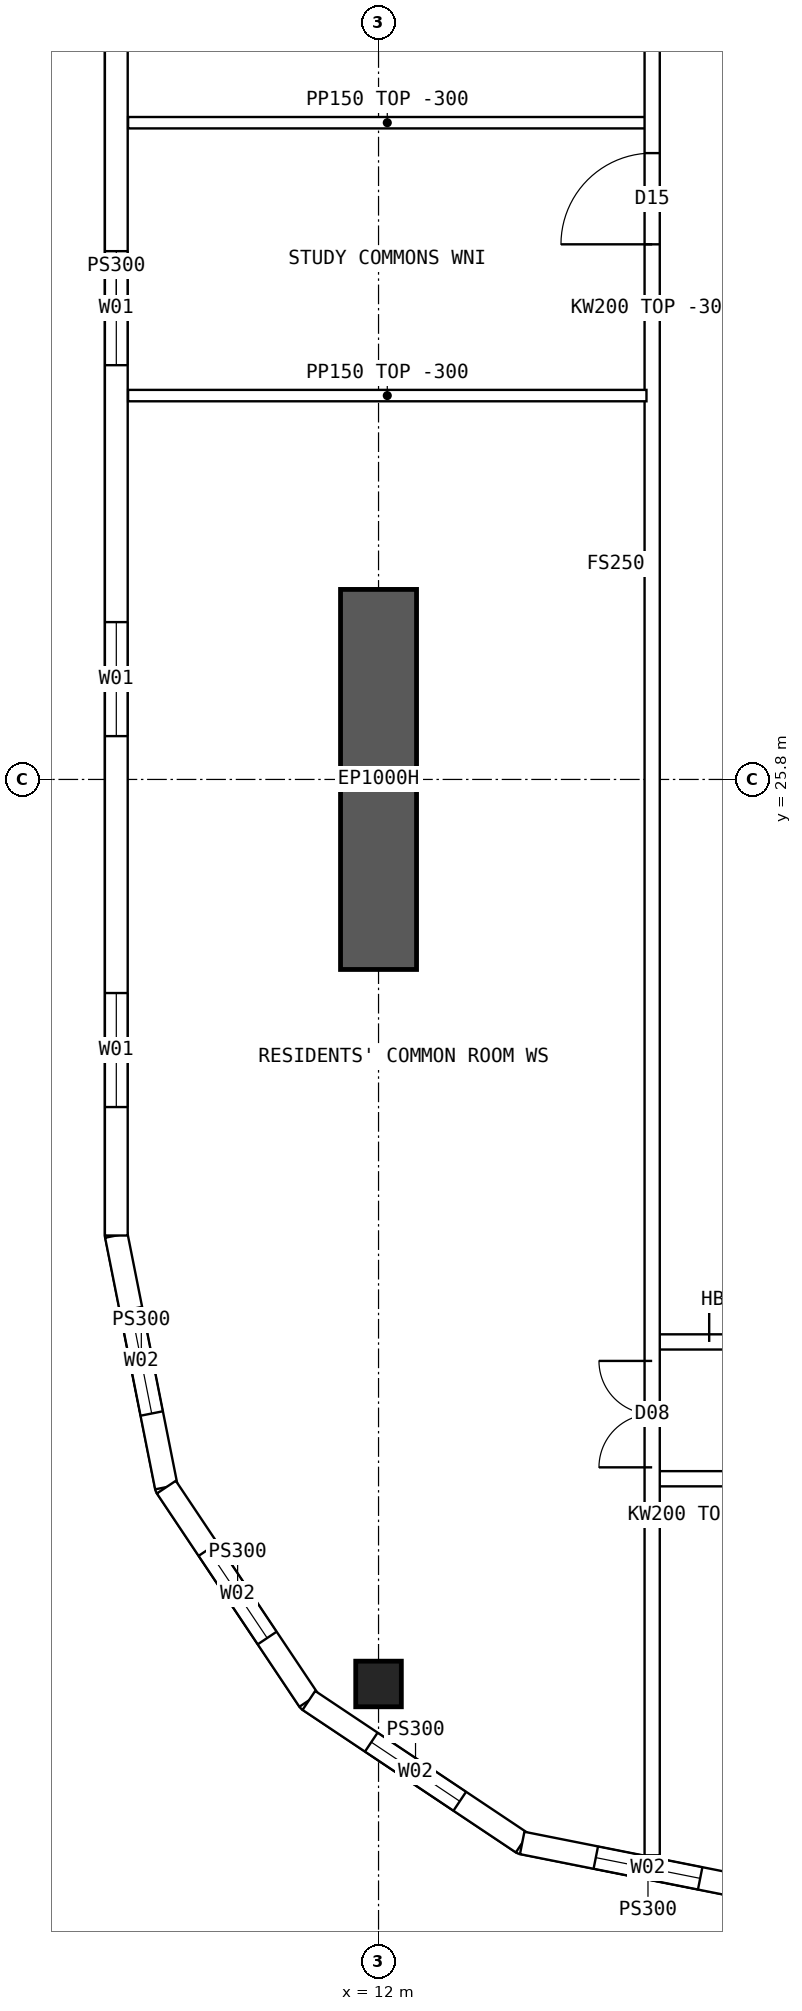
"""IFC4 building model, lengths in metres.
Left out: names, types, materials, properties, quantities, classifications, styles, units other than length and angle.
Written with IfcOpenShell. Run it as: python <this file> out.ifc"""

import sys

from ifc_helpers import new_model, si_unit, direction, frame, frame_2d, origin, origin_2d, place, context, subcontext, project, spatial, polyline, rectangle, hollow_rectangle, outline, extrude, element, fill, save


model = new_model("IFC4")
c1 = context("Model", 3, precision=1e-05, world=origin(), true_north=direction((0.0, 1.0)))
c2 = subcontext(c1, "Body", "Model", "MODEL_VIEW")
j1 = project(units=[si_unit("LENGTHUNIT", "METRE"), si_unit("PLANEANGLEUNIT", "RADIAN")], contexts=[c1])
p1 = place(None, origin())
s1 = spatial("IfcSite", under=j1, at=p1, CompositionType="ELEMENT")
p2 = place(p1, origin())
s2 = spatial("IfcBuilding", under=s1, at=p2, CompositionType="ELEMENT")
p3 = place(p2, frame((0.0, 0.0, 254.05)))
s3 = spatial("IfcBuildingStorey", under=s2, at=p3, CompositionType="ELEMENT", Elevation=254.05)
p4 = place(p3, frame((12.0, 13.9, 0.0), z_axis=(0.0, 0.0, 1.0), x_axis=(1.0, 0.0, 0.0)))
e1 = element("IfcColumn", 1, at=p4, inside=s3, PredefinedType="COLUMN", context=c2, shape_type="SweptSolid", body=[
    extrude(hollow_rectangle(XDim=0.6, YDim=0.6, WallThickness=0.06, at=origin_2d()), origin(), (0.0, 0.0, 1.0), 3.75),
])
p5 = place(p3, frame((12.0, 23.3, 0.0), z_axis=(0.0, 0.0, 1.0), x_axis=(0.0, 1.0, 0.0)))
e2 = element("IfcWall", 2, at=p5, inside=s3, PredefinedType="SHEAR", context=c2, shape_type="SweptSolid", body=[
    extrude(rectangle(XDim=5.0, YDim=1.0, at=frame_2d((2.5, 0.0))), origin(), (0.0, 0.0, 1.0), 3.75),
])
p6 = place(p3, frame((8.55, 44.2, 0.0), z_axis=(0.0, 0.0, 1.0), x_axis=(0.0, -1.0, 0.0)))
e3 = element("IfcWall", 3, at=p6, inside=s3, PredefinedType="SOLIDWALL", context=c2, shape_type="SweptSolid", body=[
    extrude(outline(polyline([(-0.015, -0.15), (24.415, -0.15), (24.385, 0.15), (0.015, 0.15), (-0.015, -0.15)])), origin(), (0.0, 0.0, 1.0), 3.45),
])
p7 = place(p6, frame((1.69, 0.0, 0.9)))
e4 = element("IfcOpeningElement", 4, at=p7, cuts=e3, PredefinedType="OPENING", context=c2, shape_type="SweptSolid", body=[
    extrude(rectangle(XDim=1.5, YDim=2.0, at=frame_2d((0.75, 1.0))), frame((0.0, 0.16, 0.0), z_axis=(0.0, -1.0, 0.0), x_axis=(1.0, 0.0, 0.0)), (0.0, 0.0, 1.0), 0.32),
])
p8 = place(p6, frame((6.57, 0.0, 0.9)))
e5 = element("IfcOpeningElement", 5, at=p8, cuts=e3, PredefinedType="OPENING", context=c2, shape_type="SweptSolid", body=[
    extrude(rectangle(XDim=1.5, YDim=2.0, at=frame_2d((0.75, 1.0))), frame((0.0, 0.16, 0.0), z_axis=(0.0, -1.0, 0.0), x_axis=(1.0, 0.0, 0.0)), (0.0, 0.0, 1.0), 0.32),
])
p9 = place(p6, frame((11.45, 0.0, 0.9)))
e6 = element("IfcOpeningElement", 6, at=p9, cuts=e3, PredefinedType="OPENING", context=c2, shape_type="SweptSolid", body=[
    extrude(rectangle(XDim=1.5, YDim=2.0, at=frame_2d((0.75, 1.0))), frame((0.0, 0.16, 0.0), z_axis=(0.0, -1.0, 0.0), x_axis=(1.0, 0.0, 0.0)), (0.0, 0.0, 1.0), 0.32),
])
p10 = place(p6, frame((16.33, 0.0, 0.9)))
e7 = element("IfcOpeningElement", 7, at=p10, cuts=e3, PredefinedType="OPENING", context=c2, shape_type="SweptSolid", body=[
    extrude(rectangle(XDim=1.5, YDim=2.0, at=frame_2d((0.75, 1.0))), frame((0.0, 0.16, 0.0), z_axis=(0.0, -1.0, 0.0), x_axis=(1.0, 0.0, 0.0)), (0.0, 0.0, 1.0), 0.32),
])
p11 = place(p6, frame((21.21, 0.0, 0.9)))
e8 = element("IfcOpeningElement", 8, at=p11, cuts=e3, PredefinedType="OPENING", context=c2, shape_type="SweptSolid", body=[
    extrude(rectangle(XDim=1.5, YDim=2.0, at=frame_2d((0.75, 1.0))), frame((0.0, 0.16, 0.0), z_axis=(0.0, -1.0, 0.0), x_axis=(1.0, 0.0, 0.0)), (0.0, 0.0, 1.0), 0.32),
])
p12 = place(p3, frame((8.55, 19.8, 0.0), z_axis=(0.0, 0.0, 1.0), x_axis=(0.19508664885, -0.980786011034, 0.0)))
e9 = element("IfcWall", 9, at=p12, inside=s3, PredefinedType="SOLIDWALL", context=c2, shape_type="SweptSolid", body=[
    extrude(outline(polyline([(-0.015, -0.15), (3.405, -0.15), (3.345, 0.15), (0.015, 0.15), (-0.015, -0.15)])), origin(), (0.0, 0.0, 1.0), 3.45),
])
p13 = place(p12, frame((0.988, 0.0, 0.9)))
e10 = element("IfcOpeningElement", 10, at=p13, cuts=e9, PredefinedType="OPENING", context=c2, shape_type="SweptSolid", body=[
    extrude(rectangle(XDim=1.4, YDim=1.8, at=frame_2d((0.7, 0.9))), frame((0.0, 0.16, 0.0), z_axis=(0.0, -1.0, 0.0), x_axis=(1.0, 0.0, 0.0)), (0.0, 0.0, 1.0), 0.32),
])
p14 = place(p3, frame((9.208, 16.49, 0.0), z_axis=(0.0, 0.0, 1.0), x_axis=(0.555567969291, -0.831471124873, 0.0)))
e11 = element("IfcWall", 11, at=p14, inside=s3, PredefinedType="SOLIDWALL", context=c2, shape_type="SweptSolid", body=[
    extrude(outline(polyline([(-0.03, -0.15), (3.405, -0.15), (3.345, 0.15), (0.03, 0.15), (-0.03, -0.15)])), origin(), (0.0, 0.0, 1.0), 3.45),
])
p15 = place(p14, frame((0.988, 0.0, 0.9)))
e12 = element("IfcOpeningElement", 12, at=p15, cuts=e11, PredefinedType="OPENING", context=c2, shape_type="SweptSolid", body=[
    extrude(rectangle(XDim=1.4, YDim=1.8, at=frame_2d((0.7, 0.9))), frame((0.0, 0.16, 0.0), z_axis=(0.0, -1.0, 0.0), x_axis=(1.0, 0.0, 0.0)), (0.0, 0.0, 1.0), 0.32),
])
p16 = place(p3, frame((11.083, 13.684, 0.0), z_axis=(0.0, 0.0, 1.0), x_axis=(0.831460037396, -0.555584562613, 0.0)))
e13 = element("IfcWall", 13, at=p16, inside=s3, PredefinedType="SOLIDWALL", context=c2, shape_type="SweptSolid", body=[
    extrude(outline(polyline([(-0.03, -0.15), (3.405, -0.15), (3.345, 0.15), (0.03, 0.15), (-0.03, -0.15)])), origin(), (0.0, 0.0, 1.0), 3.45),
])
p17 = place(p16, frame((0.988, 0.0, 0.9)))
e14 = element("IfcOpeningElement", 14, at=p17, cuts=e13, PredefinedType="OPENING", context=c2, shape_type="SweptSolid", body=[
    extrude(rectangle(XDim=1.4, YDim=1.8, at=frame_2d((0.7, 0.9))), frame((0.0, 0.16, 0.0), z_axis=(0.0, -1.0, 0.0), x_axis=(1.0, 0.0, 0.0)), (0.0, 0.0, 1.0), 0.32),
])
p18 = place(p3, frame((13.89, 11.808, 0.0), z_axis=(0.0, 0.0, 1.0), x_axis=(0.98078325777, -0.195100490205, 0.0)))
e15 = element("IfcWall", 15, at=p18, inside=s3, PredefinedType="SOLIDWALL", context=c2, shape_type="SweptSolid", body=[
    extrude(outline(polyline([(-0.03, -0.15), (3.405, -0.15), (3.345, 0.15), (0.03, 0.15), (-0.03, -0.15)])), origin(), (0.0, 0.0, 1.0), 3.45),
])
p19 = place(p18, frame((0.988, 0.0, 0.9)))
e16 = element("IfcOpeningElement", 16, at=p19, cuts=e15, PredefinedType="OPENING", context=c2, shape_type="SweptSolid", body=[
    extrude(rectangle(XDim=1.4, YDim=1.8, at=frame_2d((0.7, 0.9))), frame((0.0, 0.16, 0.0), z_axis=(0.0, -1.0, 0.0), x_axis=(1.0, 0.0, 0.0)), (0.0, 0.0, 1.0), 0.32),
])
p20 = place(p3, frame((15.6, 16.6, 0.0), z_axis=(0.0, 0.0, 1.0), x_axis=(1.0, 0.0, 0.0)))
e17 = element("IfcWall", 17, at=p20, inside=s3, PredefinedType="SOLIDWALL", context=c2, shape_type="SweptSolid", body=[
    extrude(rectangle(XDim=2.05, YDim=0.2, at=frame_2d((1.025, 0.0))), origin(), (0.0, 0.0, 1.0), 3.45),
])
p21 = place(p20, frame((0.95, 0.0, 0.0)))
e18 = element("IfcOpeningElement", 18, at=p21, cuts=e17, PredefinedType="OPENING", context=c2, shape_type="SweptSolid", body=[
    extrude(rectangle(XDim=0.9, YDim=2.1, at=frame_2d((0.45, 1.05))), frame((0.0, 0.11, 0.0), z_axis=(0.0, -1.0, 0.0), x_axis=(1.0, 0.0, 0.0)), (0.0, 0.0, 1.0), 0.22),
])
p22 = place(p3, frame((15.6, 18.4, 0.0), z_axis=(0.0, 0.0, 1.0), x_axis=(1.0, 0.0, 0.0)))
e19 = element("IfcWall", 19, at=p22, inside=s3, PredefinedType="SOLIDWALL", context=c2, shape_type="SweptSolid", body=[
    extrude(rectangle(XDim=2.05, YDim=0.2, at=frame_2d((1.025, 0.0))), origin(), (0.0, 0.0, 1.0), 3.45),
])
p23 = place(p22, frame((0.75, 0.0, 0.0)))
e20 = element("IfcOpeningElement", 20, at=p23, cuts=e19, PredefinedType="OPENING", context=c2, shape_type="SweptSolid", body=[
    extrude(rectangle(XDim=1.2, YDim=2.1, at=frame_2d((0.6, 1.05))), frame((0.0, 0.11, 0.0), z_axis=(0.0, -1.0, 0.0), x_axis=(1.0, 0.0, 0.0)), (0.0, 0.0, 1.0), 0.22),
])
p24 = place(p3, frame((8.705, 30.85, 0.0), z_axis=(0.0, 0.0, 1.0), x_axis=(1.0, 0.0, 0.0)))
e21 = element("IfcWall", 21, at=p24, inside=s3, PredefinedType="PARTITIONING", context=c2, shape_type="SweptSolid", body=[
    extrude(outline(polyline([(0.0, 0.0), (6.82, 0.0), (6.82, 3.45), (3.597, 3.45), (3.595, 3.0), (2.997, 3.0), (2.995, 3.45), (0.0, 3.45), (0.0, 0.0)])), frame((0.0, 0.075, 0.0), z_axis=(0.0, -1.0, 0.0), x_axis=(1.0, 0.0, 0.0)), (0.0, 0.0, 1.0), 0.15),
])
p25 = place(p3, frame((15.6, 11.646, 0.0), z_axis=(0.0, 0.0, 1.0), x_axis=(0.0, 1.0, 0.0)))
e22 = element("IfcWall", 22, at=p25, inside=s3, PredefinedType="SOLIDWALL", context=c2, shape_type="SweptSolid", body=[
    extrude(rectangle(XDim=40.708, YDim=0.2, at=frame_2d((20.354, 0.0))), origin(), (0.0, 0.0, 1.0), 3.45),
])
p26 = place(p25, frame((21.194, 0.0, 0.0)))
e23 = element("IfcOpeningElement", 23, at=p26, cuts=e22, PredefinedType="OPENING", context=c2, shape_type="SweptSolid", body=[
    extrude(rectangle(XDim=1.2, YDim=2.1, at=frame_2d((0.6, 1.05))), frame((0.0, 0.11, 0.0), z_axis=(0.0, -1.0, 0.0), x_axis=(1.0, 0.0, 0.0)), (0.0, 0.0, 1.0), 0.22),
])
p27 = place(p25, frame((5.104, 0.0, 0.0)))
e24 = element("IfcOpeningElement", 24, at=p27, cuts=e22, PredefinedType="OPENING", context=c2, shape_type="SweptSolid", body=[
    extrude(rectangle(XDim=1.4, YDim=2.1, at=frame_2d((0.7, 1.05))), frame((0.0, 0.11, 0.0), z_axis=(0.0, -1.0, 0.0), x_axis=(1.0, 0.0, 0.0)), (0.0, 0.0, 1.0), 0.22),
])
p28 = place(p25, frame((34.104, 0.0, 0.0)))
e25 = element("IfcOpeningElement", 25, at=p28, cuts=e22, PredefinedType="OPENING", context=c2, shape_type="SweptSolid", body=[
    extrude(rectangle(XDim=1.4, YDim=2.1, at=frame_2d((0.7, 1.05))), frame((0.0, 0.11, 0.0), z_axis=(0.0, -1.0, 0.0), x_axis=(1.0, 0.0, 0.0)), (0.0, 0.0, 1.0), 0.22),
])
p29 = place(p3, frame((8.705, 34.44, 0.0), z_axis=(0.0, 0.0, 1.0), x_axis=(1.0, 0.0, 0.0)))
e26 = element("IfcWall", 26, at=p29, inside=s3, PredefinedType="PARTITIONING", context=c2, shape_type="SweptSolid", body=[
    extrude(outline(polyline([(0.0, 0.0), (6.82, 0.0), (6.82, 3.45), (3.597, 3.45), (3.595, 3.0), (2.997, 3.0), (2.995, 3.45), (0.0, 3.45), (0.0, 0.0)])), frame((0.0, 0.075, 0.0), z_axis=(0.0, -1.0, 0.0), x_axis=(1.0, 0.0, 0.0)), (0.0, 0.0, 1.0), 0.15),
])
p30 = place(p9, origin())
e27 = element("IfcWindow", 27, at=p30, inside=s3, PartitioningType="SINGLE_PANEL", PredefinedType="WINDOW", context=c2, shape_type="SweptSolid", body=[
    extrude(rectangle(XDim=1.5, YDim=2.0, at=frame_2d((0.75, 1.0))), frame((0.0, 0.03, 0.0), z_axis=(0.0, -1.0, 0.0), x_axis=(1.0, 0.0, 0.0)), (0.0, 0.0, 1.0), 0.06),
])
fill(e6, e27)
p31 = place(p10, origin())
e28 = element("IfcWindow", 28, at=p31, inside=s3, PartitioningType="SINGLE_PANEL", PredefinedType="WINDOW", context=c2, shape_type="SweptSolid", body=[
    extrude(rectangle(XDim=1.5, YDim=2.0, at=frame_2d((0.75, 1.0))), frame((0.0, 0.03, 0.0), z_axis=(0.0, -1.0, 0.0), x_axis=(1.0, 0.0, 0.0)), (0.0, 0.0, 1.0), 0.06),
])
fill(e7, e28)
p32 = place(p11, origin())
e29 = element("IfcWindow", 29, at=p32, inside=s3, PartitioningType="SINGLE_PANEL", PredefinedType="WINDOW", context=c2, shape_type="SweptSolid", body=[
    extrude(rectangle(XDim=1.5, YDim=2.0, at=frame_2d((0.75, 1.0))), frame((0.0, 0.03, 0.0), z_axis=(0.0, -1.0, 0.0), x_axis=(1.0, 0.0, 0.0)), (0.0, 0.0, 1.0), 0.06),
])
fill(e8, e29)
p33 = place(p13, origin())
e30 = element("IfcWindow", 30, at=p33, inside=s3, PartitioningType="SINGLE_PANEL", PredefinedType="WINDOW", context=c2, shape_type="SweptSolid", body=[
    extrude(rectangle(XDim=1.4, YDim=1.8, at=frame_2d((0.7, 0.9))), frame((0.0, 0.03, 0.0), z_axis=(0.0, -1.0, 0.0), x_axis=(1.0, 0.0, 0.0)), (0.0, 0.0, 1.0), 0.06),
])
fill(e10, e30)
p34 = place(p15, origin())
e31 = element("IfcWindow", 31, at=p34, inside=s3, PartitioningType="SINGLE_PANEL", PredefinedType="WINDOW", context=c2, shape_type="SweptSolid", body=[
    extrude(rectangle(XDim=1.4, YDim=1.8, at=frame_2d((0.7, 0.9))), frame((0.0, 0.03, 0.0), z_axis=(0.0, -1.0, 0.0), x_axis=(1.0, 0.0, 0.0)), (0.0, 0.0, 1.0), 0.06),
])
fill(e12, e31)
p35 = place(p17, origin())
e32 = element("IfcWindow", 32, at=p35, inside=s3, PartitioningType="SINGLE_PANEL", PredefinedType="WINDOW", context=c2, shape_type="SweptSolid", body=[
    extrude(rectangle(XDim=1.4, YDim=1.8, at=frame_2d((0.7, 0.9))), frame((0.0, 0.03, 0.0), z_axis=(0.0, -1.0, 0.0), x_axis=(1.0, 0.0, 0.0)), (0.0, 0.0, 1.0), 0.06),
])
fill(e14, e32)
p36 = place(p19, origin())
e33 = element("IfcWindow", 33, at=p36, inside=s3, PartitioningType="SINGLE_PANEL", PredefinedType="WINDOW", context=c2, shape_type="SweptSolid", body=[
    extrude(rectangle(XDim=1.4, YDim=1.8, at=frame_2d((0.7, 0.9))), frame((0.0, 0.03, 0.0), z_axis=(0.0, -1.0, 0.0), x_axis=(1.0, 0.0, 0.0)), (0.0, 0.0, 1.0), 0.06),
])
fill(e16, e33)
p37 = place(p23, origin())
e34 = element("IfcDoor", 34, at=p37, inside=s3, OperationType="DOUBLE_DOOR_SINGLE_SWING", PredefinedType="DOOR", context=c2, shape_type="SweptSolid", body=[
    extrude(rectangle(XDim=1.2, YDim=2.1, at=frame_2d((0.6, 1.05))), frame((0.0, 0.025, 0.0), z_axis=(0.0, -1.0, 0.0), x_axis=(1.0, 0.0, 0.0)), (0.0, 0.0, 1.0), 0.05),
])
fill(e20, e34)
p38 = place(p26, origin())
e35 = element("IfcDoor", 35, at=p38, inside=s3, OperationType="SINGLE_SWING_LEFT", PredefinedType="DOOR", context=c2, shape_type="SweptSolid", body=[
    extrude(rectangle(XDim=1.2, YDim=2.1, at=frame_2d((0.6, 1.05))), frame((0.0, 0.025, 0.0), z_axis=(0.0, -1.0, 0.0), x_axis=(1.0, 0.0, 0.0)), (0.0, 0.0, 1.0), 0.05),
])
fill(e23, e35)
p39 = place(p27, origin())
e36 = element("IfcDoor", 36, at=p39, inside=s3, OperationType="DOUBLE_DOOR_SINGLE_SWING", PredefinedType="DOOR", context=c2, shape_type="SweptSolid", body=[
    extrude(rectangle(XDim=1.4, YDim=2.1, at=frame_2d((0.7, 1.05))), frame((0.0, 0.025, 0.0), z_axis=(0.0, -1.0, 0.0), x_axis=(1.0, 0.0, 0.0)), (0.0, 0.0, 1.0), 0.05),
])
fill(e24, e36)
save(model, sys.argv[1])
